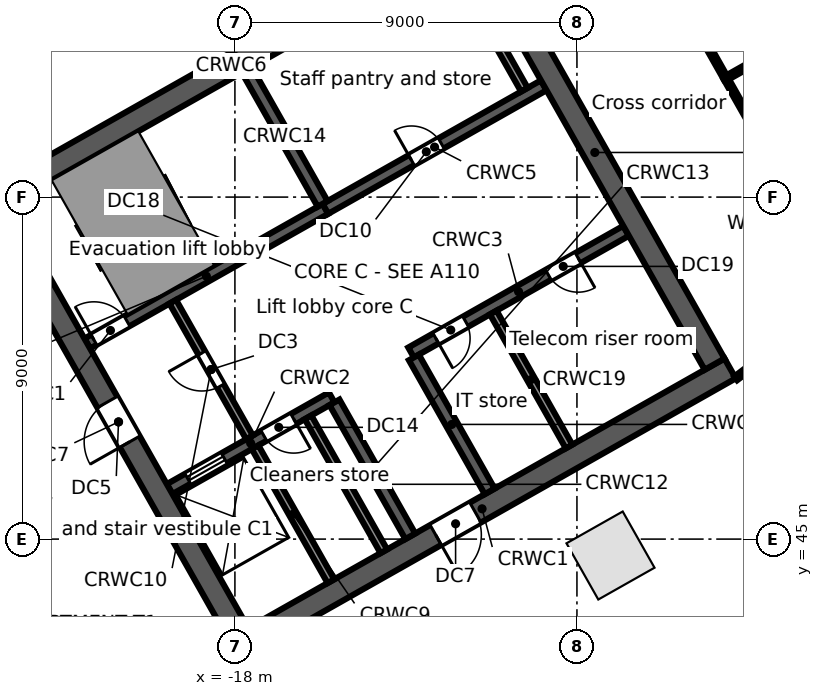
"""IFC4 building model, lengths in metres.
Left out: names, types, materials, properties, quantities, classifications, styles, units other than length and angle.
Written with IfcOpenShell. Run it as: python <this file> out.ifc"""

import sys

from ifc_helpers import new_model, si_unit, direction, frame, frame_2d, origin, origin_2d, place, context, subcontext, project, spatial, rectangle, extrude, element, fill, save


model = new_model("IFC4")
c1 = context("Model", 3, precision=1e-05, world=origin(), true_north=direction((0.0, 1.0)))
c2 = subcontext(c1, "Body", "Model", "MODEL_VIEW")
j1 = project(units=[si_unit("LENGTHUNIT", "METRE"), si_unit("PLANEANGLEUNIT", "RADIAN")], contexts=[c1])
p1 = place(None, origin())
s1 = spatial("IfcSite", under=j1, at=p1, CompositionType="ELEMENT")
p2 = place(p1, origin())
s2 = spatial("IfcBuilding", under=s1, at=p2, CompositionType="ELEMENT")
p3 = place(p2, origin())
s3 = spatial("IfcBuildingStorey", under=s2, at=p3, CompositionType="ELEMENT", Elevation=0.0)
p4 = place(p3, frame((-8.117, 44.568, 0.0), z_axis=(0.0, 0.0, 1.0), x_axis=(0.87035569594, 0.492423560103, 0.0)))
e1 = element("IfcColumn", 1, at=p4, inside=s3, PredefinedType="COLUMN", context=c2, shape_type="SweptSolid", body=[
    extrude(rectangle(XDim=1.7, YDim=1.7, at=origin_2d()), origin(), (0.0, 0.0, 1.0), 6.5),
])
p5 = place(p3, frame((-63.707, 41.701, 0.0), z_axis=(0.0, 0.0, 1.0), x_axis=(0.870355510268, 0.492423888277, 0.0)))
e2 = element("IfcWall", 2, at=p5, inside=s3, PredefinedType="STANDARD", context=c2, shape_type="SweptSolid", body=[
    extrude(rectangle(XDim=67.903, YDim=0.3, at=frame_2d((33.952, 0.0))), origin(), (0.0, 0.0, 1.0), 6.15),
])
p6 = place(p5, frame((44.274, 0.0, 0.0)))
e3 = element("IfcOpeningElement", 3, at=p6, cuts=e2, PredefinedType="OPENING", context=c2, shape_type="SweptSolid", body=[
    extrude(rectangle(XDim=1.2, YDim=2.4, at=frame_2d((0.6, 1.2))), frame((0.0, 0.16, 0.0), z_axis=(0.0, -1.0, 0.0), x_axis=(1.0, 0.0, 0.0)), (0.0, 0.0, 1.0), 0.32),
])
p7 = place(p5, frame((15.222, 0.0, 0.0)))
e4 = element("IfcOpeningElement", 4, at=p7, cuts=e2, PredefinedType="OPENING", context=c2, shape_type="SweptSolid", body=[
    extrude(rectangle(XDim=1.2, YDim=2.4, at=frame_2d((0.6, 1.2))), frame((0.0, 0.16, 0.0), z_axis=(0.0, -1.0, 0.0), x_axis=(1.0, 0.0, 0.0)), (0.0, 0.0, 1.0), 0.32),
])
p8 = place(p3, frame((-18.024, 42.104, 0.0), z_axis=(0.0, 0.0, 1.0), x_axis=(0.870360574057, 0.492414937962, 0.0)))
e5 = element("IfcWall", 5, at=p8, inside=s3, PredefinedType="SOLIDWALL", context=c2, shape_type="SweptSolid", body=[
    extrude(rectangle(XDim=15.0, YDim=0.6, at=frame_2d((7.5, 0.0))), origin(), (0.0, 0.0, 1.0), 6.15),
])
p9 = place(p8, frame((6.1, 0.0, 0.0)))
e6 = element("IfcOpeningElement", 6, at=p9, cuts=e5, PredefinedType="OPENING", context=c2, shape_type="SweptSolid", body=[
    extrude(rectangle(XDim=1.2, YDim=2.1, at=frame_2d((0.6, 1.05))), frame((0.0, 0.31, 0.0), z_axis=(0.0, -1.0, 0.0), x_axis=(1.0, 0.0, 0.0)), (0.0, 0.0, 1.0), 0.62),
])
p10 = place(p3, frame((-19.718, 46.316, 0.0), z_axis=(0.0, 0.0, 1.0), x_axis=(0.870353963862, 0.492426621528, 0.0)))
e7 = element("IfcWall", 7, at=p10, inside=s3, PredefinedType="SOLIDWALL", context=c2, shape_type="SweptSolid", body=[
    extrude(rectangle(XDim=4.9, YDim=0.3, at=frame_2d((2.45, 0.0))), origin(), (0.0, 0.0, 1.0), 6.15),
])
p11 = place(p10, frame((0.55, 0.0, 0.0)))
e8 = element("IfcOpeningElement", 8, at=p11, cuts=e7, PredefinedType="OPENING", context=c2, shape_type="SweptSolid", body=[
    extrude(rectangle(XDim=1.1, YDim=2.1, at=frame_2d((0.55, 1.05))), frame((0.0, 0.16, 0.0), z_axis=(0.0, -1.0, 0.0), x_axis=(1.0, 0.0, 0.0)), (0.0, 0.0, 1.0), 0.32),
])
p12 = place(p10, frame((2.85, 0.0, 0.0)))
e9 = element("IfcOpeningElement", 9, at=p12, cuts=e7, PredefinedType="OPENING", context=c2, shape_type="SweptSolid", body=[
    extrude(rectangle(XDim=0.9, YDim=2.1, at=frame_2d((0.45, 1.05))), frame((0.0, 0.16, 0.0), z_axis=(0.0, -1.0, 0.0), x_axis=(1.0, 0.0, 0.0)), (0.0, 0.0, 1.0), 0.32),
])
p13 = place(p3, frame((-13.365, 49.911, 0.0), z_axis=(0.0, 0.0, 1.0), x_axis=(0.870340995471, 0.49244954219, 0.0)))
e10 = element("IfcWall", 10, at=p13, inside=s3, PredefinedType="SOLIDWALL", context=c2, shape_type="SweptSolid", body=[
    extrude(rectangle(XDim=6.5, YDim=0.3, at=frame_2d((3.25, 0.0))), origin(), (0.0, 0.0, 1.0), 6.15),
])
p14 = place(p13, frame((0.75, 0.0, 0.0)))
e11 = element("IfcOpeningElement", 11, at=p14, cuts=e10, PredefinedType="OPENING", context=c2, shape_type="SweptSolid", body=[
    extrude(rectangle(XDim=0.9, YDim=2.1, at=frame_2d((0.45, 1.05))), frame((0.0, 0.16, 0.0), z_axis=(0.0, -1.0, 0.0), x_axis=(1.0, 0.0, 0.0)), (0.0, 0.0, 1.0), 0.32),
])
p15 = place(p13, frame((4.15, 0.0, 0.0)))
e12 = element("IfcOpeningElement", 12, at=p15, cuts=e10, PredefinedType="OPENING", context=c2, shape_type="SweptSolid", body=[
    extrude(rectangle(XDim=0.9, YDim=2.1, at=frame_2d((0.45, 1.05))), frame((0.0, 0.16, 0.0), z_axis=(0.0, -1.0, 0.0), x_axis=(1.0, 0.0, 0.0)), (0.0, 0.0, 1.0), 0.32),
])
p16 = place(p3, frame((-21.885, 50.146, 0.0), z_axis=(0.0, 0.0, 1.0), x_axis=(0.870359411463, 0.492416992881, 0.0)))
e13 = element("IfcWall", 13, at=p16, inside=s3, PredefinedType="SOLIDWALL", context=c2, shape_type="SweptSolid", body=[
    extrude(rectangle(XDim=7.2, YDim=0.3, at=frame_2d((3.6, 0.0))), origin(), (0.0, 0.0, 1.0), 6.15),
])
p17 = place(p16, frame((0.2, 0.0, 0.0)))
e14 = element("IfcOpeningElement", 14, at=p17, cuts=e13, PredefinedType="OPENING", context=c2, shape_type="SweptSolid", body=[
    extrude(rectangle(XDim=1.0, YDim=2.1, at=frame_2d((0.5, 1.05))), frame((0.0, 0.16, 0.0), z_axis=(0.0, -1.0, 0.0), x_axis=(1.0, 0.0, 0.0)), (0.0, 0.0, 1.0), 0.32),
])
p18 = place(p3, frame((-15.618, 53.691, 0.0), z_axis=(0.0, 0.0, 1.0), x_axis=(0.870356769198, 0.492421663121, 0.0)))
e15 = element("IfcWall", 15, at=p18, inside=s3, PredefinedType="SOLIDWALL", context=c2, shape_type="SweptSolid", body=[
    extrude(rectangle(XDim=6.6, YDim=0.3, at=frame_2d((3.3, 0.0))), origin(), (0.0, 0.0, 1.0), 6.15),
])
p19 = place(p18, frame((2.6, 0.0, 0.0)))
e16 = element("IfcOpeningElement", 16, at=p19, cuts=e15, PredefinedType="OPENING", context=c2, shape_type="SweptSolid", body=[
    extrude(rectangle(XDim=0.9, YDim=2.1, at=frame_2d((0.45, 1.05))), frame((0.0, 0.16, 0.0), z_axis=(0.0, -1.0, 0.0), x_axis=(1.0, 0.0, 0.0)), (0.0, 0.0, 1.0), 0.32),
])
p20 = place(p3, frame((-24.623, 53.767, 0.0), z_axis=(0.0, 0.0, 1.0), x_axis=(0.870356627484, 0.492421913601, 0.0)))
e17 = element("IfcWall", 17, at=p20, inside=s3, PredefinedType="SOLIDWALL", context=c2, shape_type="SweptSolid", body=[
    extrude(rectangle(XDim=15.0, YDim=0.6, at=frame_2d((7.5, 0.0))), origin(), (0.0, 0.0, 1.0), 6.15),
])
p21 = place(p3, frame((-24.214, 53.654, 0.0), z_axis=(0.0, 0.0, 1.0), x_axis=(0.492441221355, -0.870345703448, 0.0)))
e18 = element("IfcWall", 18, at=p21, inside=s3, PredefinedType="SOLIDWALL", context=c2, shape_type="SweptSolid", body=[
    extrude(rectangle(XDim=12.8, YDim=0.6, at=frame_2d((6.4, 0.0))), origin(), (0.0, 0.0, 1.0), 6.15),
])
p22 = place(p21, frame((5.8, 0.0, 0.0)))
e19 = element("IfcOpeningElement", 19, at=p22, cuts=e18, PredefinedType="OPENING", context=c2, shape_type="SweptSolid", body=[
    extrude(rectangle(XDim=1.2, YDim=2.1, at=frame_2d((0.6, 1.05))), frame((0.0, 0.31, 0.0), z_axis=(0.0, -1.0, 0.0), x_axis=(1.0, 0.0, 0.0)), (0.0, 0.0, 1.0), 0.62),
])
p23 = place(p3, frame((-17.469, 47.417, 0.0), z_axis=(0.0, 0.0, 1.0), x_axis=(0.492440575896, -0.870346068648, 0.0)))
e20 = element("IfcWall", 20, at=p23, inside=s3, PredefinedType="SOLIDWALL", context=c2, shape_type="SweptSolid", body=[
    extrude(rectangle(XDim=4.05, YDim=0.2, at=frame_2d((2.025, 0.0))), origin(), (0.0, 0.0, 1.0), 6.15),
])
p24 = place(p3, frame((-19.635, 51.246, 0.0), z_axis=(0.0, 0.0, 1.0), x_axis=(0.492408451753, -0.87036424366, 0.0)))
e21 = element("IfcWall", 21, at=p24, inside=s3, PredefinedType="PARTITIONING", context=c2, shape_type="SweptSolid", body=[
    extrude(rectangle(XDim=4.1, YDim=0.2, at=frame_2d((2.05, 0.0))), origin(), (0.0, 0.0, 1.0), 6.15),
])
p25 = place(p24, frame((1.55, 0.0, 0.0)))
e22 = element("IfcOpeningElement", 22, at=p25, cuts=e21, PredefinedType="OPENING", context=c2, shape_type="SweptSolid", body=[
    extrude(rectangle(XDim=1.0, YDim=2.1, at=frame_2d((0.5, 1.05))), frame((0.0, 0.11, 0.0), z_axis=(0.0, -1.0, 0.0), x_axis=(1.0, 0.0, 0.0)), (0.0, 0.0, 1.0), 0.22),
])
p26 = place(p3, frame((-16.076, 48.205, 0.0), z_axis=(0.0, 0.0, 1.0), x_axis=(0.492394910396, -0.870371904542, 0.0)))
e23 = element("IfcWall", 23, at=p26, inside=s3, PredefinedType="SOLIDWALL", context=c2, shape_type="SweptSolid", body=[
    extrude(rectangle(XDim=4.05, YDim=0.2, at=frame_2d((2.025, 0.0))), origin(), (0.0, 0.0, 1.0), 6.15),
])
p27 = place(p3, frame((-15.379, 48.599, 0.0), z_axis=(0.0, 0.0, 1.0), x_axis=(0.492394910396, -0.870371904542, 0.0)))
e24 = element("IfcWall", 24, at=p27, inside=s3, PredefinedType="SOLIDWALL", context=c2, shape_type="SweptSolid", body=[
    extrude(rectangle(XDim=4.05, YDim=0.3, at=frame_2d((2.025, 0.0))), origin(), (0.0, 0.0, 1.0), 6.15),
])
p28 = place(p3, frame((-17.686, 57.347, 0.0), z_axis=(0.0, 0.0, 1.0), x_axis=(0.492420746998, -0.870357287513, 0.0)))
e25 = element("IfcWall", 25, at=p28, inside=s3, PredefinedType="SOLIDWALL", context=c2, shape_type="SweptSolid", body=[
    extrude(rectangle(XDim=4.05, YDim=0.3, at=frame_2d((2.025, 0.0))), origin(), (0.0, 0.0, 1.0), 6.15),
])
p29 = place(p3, frame((-13.291, 49.781, 0.0), z_axis=(0.0, 0.0, 1.0), x_axis=(0.492394910396, -0.870371904542, 0.0)))
e26 = element("IfcWall", 26, at=p29, inside=s3, PredefinedType="SOLIDWALL", context=c2, shape_type="SweptSolid", body=[
    extrude(rectangle(XDim=4.05, YDim=0.3, at=frame_2d((2.025, 0.0))), origin(), (0.0, 0.0, 1.0), 6.15),
])
p30 = place(p3, frame((-11.202, 50.962, 0.0), z_axis=(0.0, 0.0, 1.0), x_axis=(0.49241474071, -0.870360685654, 0.0)))
e27 = element("IfcWall", 27, at=p30, inside=s3, PredefinedType="PARTITIONING", context=c2, shape_type="SweptSolid", body=[
    extrude(rectangle(XDim=4.05, YDim=0.2, at=frame_2d((2.025, 0.0))), origin(), (0.0, 0.0, 1.0), 6.15),
])
p31 = place(p3, frame((-12.377, 60.351, 0.0), z_axis=(0.0, 0.0, 1.0), x_axis=(0.492440575896, -0.870346068648, 0.0)))
e28 = element("IfcWall", 28, at=p31, inside=s3, PredefinedType="SOLIDWALL", context=c2, shape_type="SweptSolid", body=[
    extrude(rectangle(XDim=4.05, YDim=0.2, at=frame_2d((2.025, 0.0))), origin(), (0.0, 0.0, 1.0), 6.15),
])
p32 = place(p3, frame((-11.681, 60.744, 0.0), z_axis=(0.0, 0.0, 1.0), x_axis=(0.492426772896, -0.870353878221, 0.0)))
e29 = element("IfcWall", 29, at=p32, inside=s3, PredefinedType="SOLIDWALL", context=c2, shape_type="SweptSolid", body=[
    extrude(rectangle(XDim=12.8, YDim=0.6, at=frame_2d((6.4, 0.0))), origin(), (0.0, 0.0, 1.0), 6.15),
])
p33 = place(p3, frame((-26.573, 57.03, 0.0), z_axis=(0.0, 0.0, 1.0), x_axis=(0.870354792164, 0.492425157519, 0.0)))
e30 = element("IfcWall", 30, at=p33, inside=s3, PredefinedType="PARTITIONING", context=c2, shape_type="SweptSolid", body=[
    extrude(rectangle(XDim=7.499, YDim=0.125, at=frame_2d((3.75, 0.0))), origin(), (0.0, 0.0, 1.0), 6.15),
])
p34 = place(p3, frame((-10.254, 66.263, 0.0), z_axis=(0.0, 0.0, 1.0), x_axis=(0.492448703838, -0.87034146982, 0.0)))
e31 = element("IfcWall", 31, at=p34, inside=s3, PredefinedType="PARTITIONING", context=c2, shape_type="SweptSolid", body=[
    extrude(rectangle(XDim=10.5, YDim=0.125, at=frame_2d((5.25, 0.0))), origin(), (0.0, 0.0, 1.0), 5.212),
])
p35 = place(p34, frame((4.7, 0.0, 0.0)))
e32 = element("IfcOpeningElement", 32, at=p35, cuts=e31, PredefinedType="OPENING", context=c2, shape_type="SweptSolid", body=[
    extrude(rectangle(XDim=0.9, YDim=2.1, at=frame_2d((0.45, 1.05))), frame((0.0, 0.073, 0.0), z_axis=(0.0, -1.0, 0.0), x_axis=(1.0, 0.0, 0.0)), (0.0, 0.0, 1.0), 0.145),
])
p36 = place(p3, frame((-5.083, 57.124, 0.0), z_axis=(0.0, 0.0, 1.0), x_axis=(0.49235182095, -0.870396280097, 0.0)))
e33 = element("IfcWall", 33, at=p36, inside=s3, PredefinedType="PARTITIONING", context=c2, shape_type="SweptSolid", body=[
    extrude(rectangle(XDim=6.499, YDim=0.125, at=frame_2d((3.25, 0.0))), origin(), (0.0, 0.0, 1.0), 6.15),
])
p37 = place(p36, frame((2.7, 0.0, 0.0)))
e34 = element("IfcOpeningElement", 34, at=p37, cuts=e33, PredefinedType="OPENING", context=c2, shape_type="SweptSolid", body=[
    extrude(rectangle(XDim=0.9, YDim=2.1, at=frame_2d((0.45, 1.05))), frame((0.0, 0.073, 0.0), z_axis=(0.0, -1.0, 0.0), x_axis=(1.0, 0.0, 0.0)), (0.0, 0.0, 1.0), 0.145),
])
p38 = place(p3, frame((-5.083, 57.124, 0.0), z_axis=(0.0, 0.0, 1.0), x_axis=(0.870317335247, 0.492491356238, 0.0)))
e35 = element("IfcWall", 35, at=p38, inside=s3, PredefinedType="PARTITIONING", context=c2, shape_type="SweptSolid", body=[
    extrude(rectangle(XDim=4.114, YDim=0.125, at=frame_2d((2.057, 0.0))), origin(), (0.0, 0.0, 1.0), 5.212),
])
p39 = place(p3, frame((-4.821, 49.23, 0.0), z_axis=(0.0, 0.0, 1.0), x_axis=(0.795615322848, 0.605802160816, 0.0)))
e36 = element("IfcWall", 36, at=p39, inside=s3, PredefinedType="PARTITIONING", context=c2, shape_type="SweptSolid", body=[
    extrude(rectangle(XDim=3.693, YDim=0.125, at=frame_2d((1.846, 0.0))), origin(), (0.0, 0.0, 1.0), 6.15),
])
p40 = place(p39, frame((1.45, 0.0, 0.0)))
e37 = element("IfcOpeningElement", 37, at=p40, cuts=e36, PredefinedType="OPENING", context=c2, shape_type="SweptSolid", body=[
    extrude(rectangle(XDim=0.9, YDim=2.1, at=frame_2d((0.45, 1.05))), frame((0.0, 0.073, 0.0), z_axis=(0.0, -1.0, 0.0), x_axis=(1.0, 0.0, 0.0)), (0.0, 0.0, 1.0), 0.145),
])
p41 = place(p11, origin())
e38 = element("IfcDoor", 38, at=p41, inside=s3, OperationType="DOUBLE_DOOR_SLIDING", PredefinedType="DOOR", context=c2, shape_type="SweptSolid", body=[
    extrude(rectangle(XDim=1.1, YDim=2.1, at=frame_2d((0.55, 1.05))), frame((0.0, 0.025, 0.0), z_axis=(0.0, -1.0, 0.0), x_axis=(1.0, 0.0, 0.0)), (0.0, 0.0, 1.0), 0.05),
])
fill(e8, e38)
p42 = place(p17, origin())
e39 = element("IfcDoor", 39, at=p42, inside=s3, OperationType="SINGLE_SWING_LEFT", PredefinedType="DOOR", context=c2, shape_type="SweptSolid", body=[
    extrude(rectangle(XDim=1.0, YDim=2.1, at=frame_2d((0.5, 1.05))), frame((0.0, 0.025, 0.0), z_axis=(0.0, -1.0, 0.0), x_axis=(1.0, 0.0, 0.0)), (0.0, 0.0, 1.0), 0.05),
])
fill(e14, e39)
p43 = place(p25, frame((1.0, 0.0, 0.0), z_axis=(0.0, 0.0, 1.0), x_axis=(-1.0, 0.0, 0.0)))
e40 = element("IfcDoor", 40, at=p43, inside=s3, OperationType="SINGLE_SWING_RIGHT", PredefinedType="DOOR", context=c2, shape_type="SweptSolid", body=[
    extrude(rectangle(XDim=1.0, YDim=2.1, at=frame_2d((0.5, 1.05))), frame((0.0, 0.025, 0.0), z_axis=(0.0, -1.0, 0.0), x_axis=(1.0, 0.0, 0.0)), (0.0, 0.0, 1.0), 0.05),
])
fill(e22, e40)
p44 = place(p22, frame((1.2, 0.0, 0.0), z_axis=(0.0, 0.0, 1.0), x_axis=(-1.0, 0.0, 0.0)))
e41 = element("IfcDoor", 41, at=p44, inside=s3, OperationType="SINGLE_SWING_LEFT", PredefinedType="DOOR", context=c2, shape_type="SweptSolid", body=[
    extrude(rectangle(XDim=1.2, YDim=2.1, at=frame_2d((0.6, 1.05))), frame((0.0, 0.025, 0.0), z_axis=(0.0, -1.0, 0.0), x_axis=(1.0, 0.0, 0.0)), (0.0, 0.0, 1.0), 0.05),
])
fill(e19, e41)
p45 = place(p9, frame((1.2, 0.0, 0.0), z_axis=(0.0, 0.0, 1.0), x_axis=(-1.0, 0.0, 0.0)))
e42 = element("IfcDoor", 42, at=p45, inside=s3, OperationType="SINGLE_SWING_RIGHT", PredefinedType="DOOR", context=c2, shape_type="SweptSolid", body=[
    extrude(rectangle(XDim=1.2, YDim=2.1, at=frame_2d((0.6, 1.05))), frame((0.0, 0.025, 0.0), z_axis=(0.0, -1.0, 0.0), x_axis=(1.0, 0.0, 0.0)), (0.0, 0.0, 1.0), 0.05),
])
fill(e6, e42)
p46 = place(p19, origin())
e43 = element("IfcDoor", 43, at=p46, inside=s3, OperationType="SINGLE_SWING_LEFT", PredefinedType="DOOR", context=c2, shape_type="SweptSolid", body=[
    extrude(rectangle(XDim=0.9, YDim=2.1, at=frame_2d((0.45, 1.05))), frame((0.0, 0.025, 0.0), z_axis=(0.0, -1.0, 0.0), x_axis=(1.0, 0.0, 0.0)), (0.0, 0.0, 1.0), 0.05),
])
fill(e16, e43)
p47 = place(p12, frame((0.9, 0.0, 0.0), z_axis=(0.0, 0.0, 1.0), x_axis=(-1.0, 0.0, 0.0)))
e44 = element("IfcDoor", 44, at=p47, inside=s3, OperationType="SINGLE_SWING_LEFT", PredefinedType="DOOR", context=c2, shape_type="SweptSolid", body=[
    extrude(rectangle(XDim=0.9, YDim=2.1, at=frame_2d((0.45, 1.05))), frame((0.0, 0.025, 0.0), z_axis=(0.0, -1.0, 0.0), x_axis=(1.0, 0.0, 0.0)), (0.0, 0.0, 1.0), 0.05),
])
fill(e9, e44)
p48 = place(p14, frame((0.9, 0.0, 0.0), z_axis=(0.0, 0.0, 1.0), x_axis=(-1.0, 0.0, 0.0)))
e45 = element("IfcDoor", 45, at=p48, inside=s3, OperationType="SINGLE_SWING_RIGHT", PredefinedType="DOOR", context=c2, shape_type="SweptSolid", body=[
    extrude(rectangle(XDim=0.9, YDim=2.1, at=frame_2d((0.45, 1.05))), frame((0.0, 0.025, 0.0), z_axis=(0.0, -1.0, 0.0), x_axis=(1.0, 0.0, 0.0)), (0.0, 0.0, 1.0), 0.05),
])
fill(e11, e45)
p49 = place(p15, frame((0.9, 0.0, 0.0), z_axis=(0.0, 0.0, 1.0), x_axis=(-1.0, 0.0, 0.0)))
e46 = element("IfcDoor", 46, at=p49, inside=s3, OperationType="SINGLE_SWING_LEFT", PredefinedType="DOOR", context=c2, shape_type="SweptSolid", body=[
    extrude(rectangle(XDim=0.9, YDim=2.1, at=frame_2d((0.45, 1.05))), frame((0.0, 0.025, 0.0), z_axis=(0.0, -1.0, 0.0), x_axis=(1.0, 0.0, 0.0)), (0.0, 0.0, 1.0), 0.05),
])
fill(e12, e46)
save(model, sys.argv[1])
